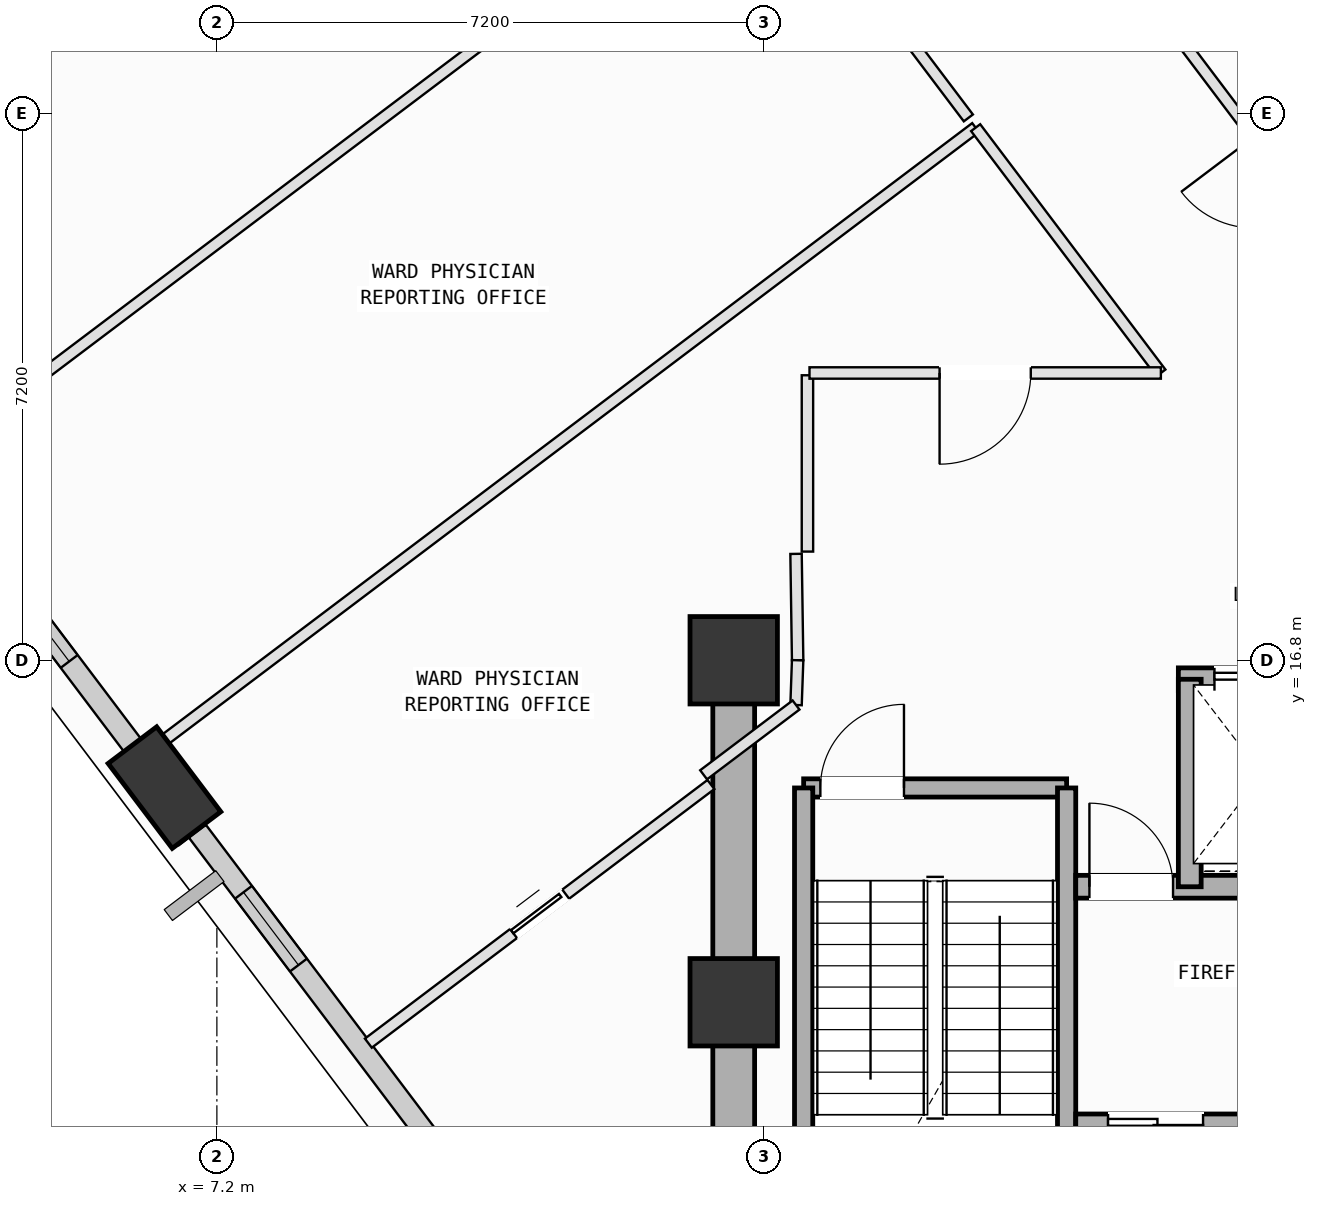
"""IFC4 building model, lengths in metres.
Left out: names, types, materials, properties, quantities, classifications, styles, units other than length and angle.
Written with IfcOpenShell. Run it as: python <this file> out.ifc"""

import sys

from ifc_helpers import new_model, si_unit, direction, frame, frame_2d, origin, origin_2d, place, context, subcontext, project, spatial, rectangle, extrude, element, fill, save


model = new_model("IFC4")
c1 = context("Model", 3, precision=1e-05, world=origin(), true_north=direction((0.0, 1.0)))
c2 = subcontext(c1, "Body", "Model", "MODEL_VIEW")
j1 = project(units=[si_unit("LENGTHUNIT", "METRE"), si_unit("PLANEANGLEUNIT", "RADIAN")], contexts=[c1])
p1 = place(None, origin())
s1 = spatial("IfcSite", under=j1, at=p1, CompositionType="ELEMENT")
p2 = place(p1, origin())
s2 = spatial("IfcBuilding", under=s1, at=p2, CompositionType="ELEMENT")
p3 = place(p2, frame((0.0, 0.0, 181.8)))
s3 = spatial("IfcBuildingStorey", under=s2, at=p3, CompositionType="ELEMENT", Elevation=181.8)
for number, where, z_axis, x_axis in (
    (1, (14.0, 12.3, 0.0), (0.0, 0.0, 1.0), (1.0, 0.0, 0.0)),
    (2, (14.0, 16.8, 0.0), (0.0, 0.0, 1.0), (1.0, 0.0, 0.0)),
):
    element("IfcColumn", number, at=place(p3, frame(where, z_axis=z_axis, x_axis=x_axis)), inside=s3, PredefinedType="COLUMN", context=c2, shape_type="SweptSolid", body=[
        extrude(rectangle(XDim=1.15, YDim=1.15, at=origin_2d()), origin(), (0.0, 0.0, 1.0), 4.0),
    ])
p4 = place(p3, frame((6.51, 15.125, 0.002), z_axis=(0.040764575419, -0.111131997272, 0.992969248554), x_axis=(-0.838574209491, 0.536533215554, 0.094474355164)))
e3 = element("IfcColumn", 3, at=p4, inside=s3, PredefinedType="COLUMN", context=c2, shape_type="SweptSolid", body=[
    extrude(rectangle(XDim=1.4, YDim=0.8, at=origin_2d()), origin(), (0.0, 0.0, 1.0), 4.025),
])
p5 = place(p3, frame((6.352, 15.335, 0.0), z_axis=(0.0, 0.0, 1.0), x_axis=(-0.602530491205, 0.798095863395, 0.0)))
e4 = element("IfcWall", 4, at=p5, inside=s3, PredefinedType="SOLIDWALL", context=c2, shape_type="SweptSolid", body=[
    extrude(rectangle(XDim=5.628, YDim=0.28, at=frame_2d((2.814, 0.0))), origin(), (0.0, 0.0, 1.0), 3.265),
])
p6 = place(p5, frame((1.817, 0.0, 0.75)))
e5 = element("IfcOpeningElement", 5, at=p6, cuts=e4, PredefinedType="OPENING", context=c2, shape_type="SweptSolid", body=[
    extrude(rectangle(XDim=1.8, YDim=2.05, at=frame_2d((0.9, 1.025))), frame((0.0, 0.15, 0.0), z_axis=(0.0, -1.0, 0.0), x_axis=(1.0, 0.0, 0.0)), (0.0, 0.0, 1.0), 0.3),
])
p7 = place(p3, frame((10.355, 10.031, 0.0), z_axis=(0.0, 0.0, 1.0), x_axis=(-0.602494498612, 0.79812303509, 0.0)))
e6 = element("IfcWall", 6, at=p7, inside=s3, PredefinedType="SOLIDWALL", context=c2, shape_type="SweptSolid", body=[
    extrude(rectangle(XDim=5.662, YDim=0.28, at=frame_2d((2.831, 0.0))), origin(), (0.0, 0.0, 1.0), 3.265),
])
p8 = place(p7, frame((3.456, 0.0, 0.75)))
e7 = element("IfcOpeningElement", 7, at=p8, cuts=e6, PredefinedType="OPENING", context=c2, shape_type="SweptSolid", body=[
    extrude(rectangle(XDim=1.2, YDim=1.75, at=frame_2d((0.6, 0.875))), frame((0.0, 0.15, 0.0), z_axis=(0.0, -1.0, 0.0), x_axis=(1.0, 0.0, 0.0)), (0.0, 0.0, 1.0), 0.3),
])
p9 = place(p3, frame((14.92, 15.12, 0.0), z_axis=(0.0, 0.0, 1.0), x_axis=(1.0, 0.0, 0.0)))
e8 = element("IfcWall", 8, at=p9, inside=s3, PredefinedType="SOLIDWALL", context=c2, shape_type="SweptSolid", body=[
    extrude(rectangle(XDim=3.46, YDim=0.24, at=frame_2d((1.73, 0.0))), origin(), (0.0, 0.0, 1.0), 3.78),
])
p10 = place(p9, frame((0.22, 0.0, 0.0)))
e9 = element("IfcOpeningElement", 9, at=p10, cuts=e8, PredefinedType="OPENING", context=c2, shape_type="SweptSolid", body=[
    extrude(rectangle(XDim=1.1, YDim=2.15, at=frame_2d((0.55, 1.075))), frame((0.0, 0.13, 0.0), z_axis=(0.0, -1.0, 0.0), x_axis=(1.0, 0.0, 0.0)), (0.0, 0.0, 1.0), 0.26),
])
for number, where, z_axis, x_axis in (
    (10, (18.38, 15.12, 0.0), (0.0, 0.0, 1.0), (0.0, -1.0, 0.0)),
    (11, (14.92, 8.075, 0.0), (0.0, 0.0, 1.0), (0.0, 1.0, 0.0)),
):
    element("IfcWall", number, at=place(p3, frame(where, z_axis=z_axis, x_axis=x_axis)), inside=s3, PredefinedType="SOLIDWALL", context=c2, shape_type="SweptSolid", body=[
        extrude(rectangle(XDim=7.045, YDim=0.24, at=frame_2d((3.522, 0.0))), origin(), (0.0, 0.0, 1.0), 3.78),
    ])
p11 = place(p3, frame((14.0, 16.8, 0.0), z_axis=(0.0, 0.0, 1.0), x_axis=(0.0, -1.0, 0.0)))
e12 = element("IfcWall", 12, at=p11, inside=s3, PredefinedType="SHEAR", context=c2, shape_type="SweptSolid", body=[
    extrude(rectangle(XDim=9.0, YDim=0.55, at=frame_2d((4.5, 0.0))), origin(), (0.0, 0.0, 1.0), 3.78),
])
p12 = place(p3, frame((19.85, 16.55, 0.0), z_axis=(0.0, 0.0, 1.0), x_axis=(1.0, 0.0, 0.0)))
e13 = element("IfcWall", 13, at=p12, inside=s3, PredefinedType="SOLIDWALL", context=c2, shape_type="SweptSolid", body=[
    extrude(rectangle(XDim=4.375, YDim=0.3, at=frame_2d((2.188, 0.0))), origin(), (0.0, 0.0, 1.0), 3.78),
])
p13 = place(p12, frame((0.475, 0.0, 0.0)))
e14 = element("IfcOpeningElement", 14, at=p13, cuts=e13, PredefinedType="OPENING", context=c2, shape_type="SweptSolid", body=[
    extrude(rectangle(XDim=1.25, YDim=2.18, at=frame_2d((0.625, 1.09))), frame((0.0, 0.16, 0.0), z_axis=(0.0, -1.0, 0.0), x_axis=(1.0, 0.0, 0.0)), (0.0, 0.0, 1.0), 0.32),
])
p14 = place(p12, frame((2.49, 0.0, 0.0)))
e15 = element("IfcOpeningElement", 15, at=p14, cuts=e13, PredefinedType="OPENING", context=c2, shape_type="SweptSolid", body=[
    extrude(rectangle(XDim=1.02, YDim=2.12, at=frame_2d((0.51, 1.06))), frame((0.0, 0.16, 0.0), z_axis=(0.0, -1.0, 0.0), x_axis=(1.0, 0.0, 0.0)), (0.0, 0.0, 1.0), 0.32),
])
p15 = place(p3, frame((18.5, 10.68, 0.0), z_axis=(0.0, 0.0, 1.0), x_axis=(1.0, 0.0, 0.0)))
e16 = element("IfcWall", 16, at=p15, inside=s3, PredefinedType="SOLIDWALL", context=c2, shape_type="SweptSolid", body=[
    extrude(rectangle(XDim=5.3, YDim=0.3, at=frame_2d((2.65, 0.0))), origin(), (0.0, 0.0, 1.0), 3.78),
])
p16 = place(p15, frame((4.22, 0.0, 0.0)))
e17 = element("IfcOpeningElement", 17, at=p16, cuts=e16, PredefinedType="OPENING", context=c2, shape_type="SweptSolid", body=[
    extrude(rectangle(XDim=0.86, YDim=2.06, at=frame_2d((0.43, 1.03))), frame((0.0, 0.16, 0.0), z_axis=(0.0, -1.0, 0.0), x_axis=(1.0, 0.0, 0.0)), (0.0, 0.0, 1.0), 0.32),
])
p17 = place(p15, frame((0.425, 0.0, 0.0)))
e18 = element("IfcOpeningElement", 18, at=p17, cuts=e16, PredefinedType="OPENING", context=c2, shape_type="SweptSolid", body=[
    extrude(rectangle(XDim=1.25, YDim=2.18, at=frame_2d((0.625, 1.09))), frame((0.0, 0.16, 0.0), z_axis=(0.0, -1.0, 0.0), x_axis=(1.0, 0.0, 0.0)), (0.0, 0.0, 1.0), 0.32),
])
p18 = place(p15, frame((2.525, 0.0, 0.0)))
e19 = element("IfcOpeningElement", 19, at=p18, cuts=e16, PredefinedType="OPENING", context=c2, shape_type="SweptSolid", body=[
    extrude(rectangle(XDim=1.25, YDim=2.18, at=frame_2d((0.625, 1.09))), frame((0.0, 0.16, 0.0), z_axis=(0.0, -1.0, 0.0), x_axis=(1.0, 0.0, 0.0)), (0.0, 0.0, 1.0), 0.32),
])
p19 = place(p3, frame((18.5, 13.82, 0.0), z_axis=(0.0, 0.0, 1.0), x_axis=(1.0, 0.0, 0.0)))
e20 = element("IfcWall", 20, at=p19, inside=s3, PredefinedType="SOLIDWALL", context=c2, shape_type="SweptSolid", body=[
    extrude(rectangle(XDim=5.3, YDim=0.3, at=frame_2d((2.65, 0.0))), origin(), (0.0, 0.0, 1.0), 3.78),
])
p20 = place(p19, frame((0.18, 0.0, 0.0)))
e21 = element("IfcOpeningElement", 21, at=p20, cuts=e20, PredefinedType="OPENING", context=c2, shape_type="SweptSolid", body=[
    extrude(rectangle(XDim=1.1, YDim=2.15, at=frame_2d((0.55, 1.075))), frame((0.0, 0.16, 0.0), z_axis=(0.0, -1.0, 0.0), x_axis=(1.0, 0.0, 0.0)), (0.0, 0.0, 1.0), 0.32),
])
p21 = place(p3, frame((20.0, 13.82, 0.0), z_axis=(0.0, 0.0, 1.0), x_axis=(0.0, 1.0, 0.0)))
e22 = element("IfcWall", 22, at=p21, inside=s3, PredefinedType="SOLIDWALL", context=c2, shape_type="SweptSolid", body=[
    extrude(rectangle(XDim=2.73, YDim=0.3, at=frame_2d((1.365, 0.0))), origin(), (0.0, 0.0, 1.0), 3.78),
])
p22 = place(p3, frame((9.193, 11.762, 0.0), z_axis=(0.0, 0.0, 1.0), x_axis=(0.798045187467, 0.602597609323, 0.0)))
e23 = element("IfcWall", 23, at=p22, inside=s3, PredefinedType="PARTITIONING", context=c2, shape_type="SweptSolid", body=[
    extrude(rectangle(XDim=5.647, YDim=0.15, at=frame_2d((2.824, 0.0))), origin(), (0.0, 0.0, 1.0), 3.78),
])
p23 = place(p22, frame((2.394, 0.0, 0.0)))
e24 = element("IfcOpeningElement", 24, at=p23, cuts=e23, PredefinedType="OPENING", context=c2, shape_type="SweptSolid", body=[
    extrude(rectangle(XDim=0.86, YDim=2.06, at=frame_2d((0.43, 1.03))), frame((0.0, 0.085, 0.0), z_axis=(0.0, -1.0, 0.0), x_axis=(1.0, 0.0, 0.0)), (0.0, 0.0, 1.0), 0.17),
])
p24 = place(p3, frame((14.97, 20.55, 0.0), z_axis=(0.0, 0.0, 1.0), x_axis=(0.0, -1.0, 0.0)))
e25 = element("IfcWall", 25, at=p24, inside=s3, PredefinedType="PARTITIONING", context=c2, shape_type="SweptSolid", body=[
    extrude(rectangle(XDim=2.32, YDim=0.15, at=frame_2d((1.16, 0.0))), origin(), (0.0, 0.0, 1.0), 3.78),
])
p25 = place(p3, frame((14.82, 18.2, 0.0), z_axis=(0.0, 0.0, 1.0), x_axis=(0.01499656939, -0.99988754513, 0.0)))
e26 = element("IfcWall", 26, at=p25, inside=s3, PredefinedType="PARTITIONING", context=c2, shape_type="SweptSolid", body=[
    extrude(rectangle(XDim=1.4, YDim=0.15, at=frame_2d((0.7, 0.0))), origin(), (0.0, 0.0, 1.0), 3.78),
])
p26 = place(p3, frame((14.841, 16.8, 0.0), z_axis=(0.0, 0.0, 1.0), x_axis=(-0.035617667676, -0.999365489573, 0.0)))
e27 = element("IfcWall", 27, at=p26, inside=s3, PredefinedType="PARTITIONING", context=c2, shape_type="SweptSolid", body=[
    extrude(rectangle(XDim=0.59, YDim=0.15, at=frame_2d((0.295, 0.0))), origin(), (0.0, 0.0, 1.0), 3.78),
])
p27 = place(p3, frame((14.82, 16.211, 0.0), z_axis=(0.0, 0.0, 1.0), x_axis=(-0.798130998248, -0.602483949691, 0.0)))
e28 = element("IfcWall", 28, at=p27, inside=s3, PredefinedType="PARTITIONING", context=c2, shape_type="SweptSolid", body=[
    extrude(rectangle(XDim=1.524, YDim=0.15, at=frame_2d((0.762, 0.0))), origin(), (0.0, 0.0, 1.0), 3.78),
])
p28 = place(p3, frame((6.76, 14.412, 0.0), z_axis=(0.0, 0.0, 1.0), x_axis=(-0.602660806532, 0.797997463824, 0.0)))
e29 = element("IfcWall", 29, at=p28, inside=s3, PredefinedType="PARTITIONING", context=c2, shape_type="SweptSolid", body=[
    extrude(rectangle(XDim=0.982, YDim=0.15, at=frame_2d((0.491, 0.0))), origin(), (0.0, 0.0, 1.0), 3.265),
])
p29 = place(p3, frame((6.301, 15.593, 0.0), z_axis=(0.0, 0.0, 1.0), x_axis=(0.798111656514, 0.60250957149, 0.0)))
e30 = element("IfcWall", 30, at=p29, inside=s3, PredefinedType="PARTITIONING", context=c2, shape_type="SweptSolid", body=[
    extrude(rectangle(XDim=13.635, YDim=0.15, at=frame_2d((6.817, 0.0))), origin(), (0.0, 0.0, 1.0), 3.78),
])
p30 = place(p3, frame((17.183, 23.808, 0.0), z_axis=(0.0, 0.0, 1.0), x_axis=(0.602527348014, -0.798098236369, 0.0)))
e31 = element("IfcWall", 31, at=p30, inside=s3, PredefinedType="PARTITIONING", context=c2, shape_type="SweptSolid", body=[
    extrude(rectangle(XDim=4.045, YDim=0.15, at=frame_2d((2.022, 0.0))), origin(), (0.0, 0.0, 1.0), 3.78),
])
p31 = place(p3, frame((19.62, 20.58, 0.0), z_axis=(0.0, 0.0, 1.0), x_axis=(-1.0, 0.0, 0.0)))
e32 = element("IfcWall", 32, at=p31, inside=s3, PredefinedType="PARTITIONING", context=c2, shape_type="SweptSolid", body=[
    extrude(rectangle(XDim=4.623, YDim=0.15, at=frame_2d((2.312, 0.0))), origin(), (0.0, 0.0, 1.0), 3.78),
])
p32 = place(p31, frame((1.711, 0.0, 0.0)))
e33 = element("IfcOpeningElement", 33, at=p32, cuts=e32, PredefinedType="OPENING", context=c2, shape_type="SweptSolid", body=[
    extrude(rectangle(XDim=1.2, YDim=2.15, at=frame_2d((0.6, 1.075))), frame((0.0, 0.085, 0.0), z_axis=(0.0, -1.0, 0.0), x_axis=(1.0, 0.0, 0.0)), (0.0, 0.0, 1.0), 0.17),
])
p33 = place(p3, frame((3.409, 19.424, 0.0), z_axis=(0.0, 0.0, 1.0), x_axis=(0.798120266847, 0.60249816568, 0.0)))
e34 = element("IfcWall", 34, at=p33, inside=s3, PredefinedType="PARTITIONING", context=c2, shape_type="SweptSolid", body=[
    extrude(rectangle(XDim=13.635, YDim=0.15, at=frame_2d((6.817, 0.0))), origin(), (0.0, 0.0, 1.0), 3.78),
])
p34 = place(p3, frame((14.291, 27.639, 0.0), z_axis=(0.0, 0.0, 1.0), x_axis=(0.602581465391, -0.798057377365, 0.0)))
e35 = element("IfcWall", 35, at=p34, inside=s3, PredefinedType="PARTITIONING", context=c2, shape_type="SweptSolid", body=[
    extrude(rectangle(XDim=4.64, YDim=0.15, at=frame_2d((2.32, 0.0))), origin(), (0.0, 0.0, 1.0), 3.78),
])
p35 = place(p34, frame((1.72, 0.0, 0.0)))
e36 = element("IfcOpeningElement", 36, at=p35, cuts=e35, PredefinedType="OPENING", context=c2, shape_type="SweptSolid", body=[
    extrude(rectangle(XDim=1.2, YDim=2.15, at=frame_2d((0.6, 1.075))), frame((0.0, 0.085, 0.0), z_axis=(0.0, -1.0, 0.0), x_axis=(1.0, 0.0, 0.0)), (0.0, 0.0, 1.0), 0.17),
])
p36 = place(p3, frame((2.509, 24.759, 0.0), z_axis=(0.0, 0.0, 1.0), x_axis=(0.798120739774, 0.6024975392, 0.0)))
e37 = element("IfcWall", 37, at=p36, inside=s3, PredefinedType="PARTITIONING", context=c2, shape_type="SweptSolid", body=[
    extrude(rectangle(XDim=11.138, YDim=0.15, at=frame_2d((5.569, 0.0))), origin(), (0.0, 0.0, 1.0), 3.265),
])
p37 = place(p3, frame((23.191, 20.58, 0.0), z_axis=(0.0, 0.0, 1.0), x_axis=(-0.602464385219, 0.798145766476, 0.0)))
e38 = element("IfcWall", 38, at=p37, inside=s3, PredefinedType="PARTITIONING", context=c2, shape_type="SweptSolid", body=[
    extrude(rectangle(XDim=6.586, YDim=0.15, at=frame_2d((3.293, 0.0))), origin(), (0.0, 0.0, 1.0), 3.78),
])
p38 = place(p37, frame((2.693, 0.0, 0.0)))
e39 = element("IfcOpeningElement", 39, at=p38, cuts=e38, PredefinedType="OPENING", context=c2, shape_type="SweptSolid", body=[
    extrude(rectangle(XDim=1.2, YDim=2.15, at=frame_2d((0.6, 1.075))), frame((0.0, 0.085, 0.0), z_axis=(0.0, -1.0, 0.0), x_axis=(1.0, 0.0, 0.0)), (0.0, 0.0, 1.0), 0.17),
])
p39 = place(p6, origin())
e40 = element("IfcWindow", 40, at=p39, inside=s3, PartitioningType="SINGLE_PANEL", PredefinedType="WINDOW", context=c2, shape_type="SweptSolid", body=[
    extrude(rectangle(XDim=1.8, YDim=2.05, at=frame_2d((0.9, 1.025))), frame((0.0, 0.03, 0.0), z_axis=(0.0, -1.0, 0.0), x_axis=(1.0, 0.0, 0.0)), (0.0, 0.0, 1.0), 0.06),
])
fill(e5, e40)
p40 = place(p8, origin())
e41 = element("IfcWindow", 41, at=p40, inside=s3, PartitioningType="SINGLE_PANEL", PredefinedType="WINDOW", context=c2, shape_type="SweptSolid", body=[
    extrude(rectangle(XDim=1.2, YDim=1.75, at=frame_2d((0.6, 0.875))), frame((0.0, 0.03, 0.0), z_axis=(0.0, -1.0, 0.0), x_axis=(1.0, 0.0, 0.0)), (0.0, 0.0, 1.0), 0.06),
])
fill(e7, e41)
p41 = place(p10, origin())
e42 = element("IfcDoor", 42, at=p41, inside=s3, OperationType="SINGLE_SWING_RIGHT", PredefinedType="DOOR", context=c2, shape_type="SweptSolid", body=[
    extrude(rectangle(XDim=1.1, YDim=2.15, at=frame_2d((0.55, 1.075))), frame((0.0, 0.025, 0.0), z_axis=(0.0, -1.0, 0.0), x_axis=(1.0, 0.0, 0.0)), (0.0, 0.0, 1.0), 0.05),
])
fill(e9, e42)
p42 = place(p20, origin())
e43 = element("IfcDoor", 43, at=p42, inside=s3, OperationType="SINGLE_SWING_LEFT", PredefinedType="DOOR", context=c2, shape_type="SweptSolid", body=[
    extrude(rectangle(XDim=1.1, YDim=2.15, at=frame_2d((0.55, 1.075))), frame((0.0, 0.025, 0.0), z_axis=(0.0, -1.0, 0.0), x_axis=(1.0, 0.0, 0.0)), (0.0, 0.0, 1.0), 0.05),
])
fill(e21, e43)
p43 = place(p17, origin())
e44 = element("IfcDoor", 44, at=p43, inside=s3, OperationType="DOUBLE_DOOR_SLIDING", PredefinedType="DOOR", context=c2, shape_type="SweptSolid", body=[
    extrude(rectangle(XDim=1.25, YDim=2.18, at=frame_2d((0.625, 1.09))), frame((0.0, 0.025, 0.0), z_axis=(0.0, -1.0, 0.0), x_axis=(1.0, 0.0, 0.0)), (0.0, 0.0, 1.0), 0.05),
])
fill(e18, e44)
p44 = place(p13, origin())
e45 = element("IfcDoor", 45, at=p44, inside=s3, OperationType="DOUBLE_DOOR_SLIDING", PredefinedType="DOOR", context=c2, shape_type="SweptSolid", body=[
    extrude(rectangle(XDim=1.25, YDim=2.18, at=frame_2d((0.625, 1.09))), frame((0.0, 0.025, 0.0), z_axis=(0.0, -1.0, 0.0), x_axis=(1.0, 0.0, 0.0)), (0.0, 0.0, 1.0), 0.05),
])
fill(e14, e45)
p45 = place(p32, origin())
e46 = element("IfcDoor", 46, at=p45, inside=s3, OperationType="SINGLE_SWING_RIGHT", PredefinedType="DOOR", context=c2, shape_type="SweptSolid", body=[
    extrude(rectangle(XDim=1.2, YDim=2.15, at=frame_2d((0.6, 1.075))), frame((0.0, 0.025, 0.0), z_axis=(0.0, -1.0, 0.0), x_axis=(1.0, 0.0, 0.0)), (0.0, 0.0, 1.0), 0.05),
])
fill(e33, e46)
p46 = place(p23, origin())
e47 = element("IfcDoor", 47, at=p46, inside=s3, OperationType="SLIDING_TO_LEFT", PredefinedType="DOOR", context=c2, shape_type="SweptSolid", body=[
    extrude(rectangle(XDim=0.86, YDim=2.06, at=frame_2d((0.43, 1.03))), frame((0.0, 0.025, 0.0), z_axis=(0.0, -1.0, 0.0), x_axis=(1.0, 0.0, 0.0)), (0.0, 0.0, 1.0), 0.05),
])
fill(e24, e47)
save(model, sys.argv[1])
